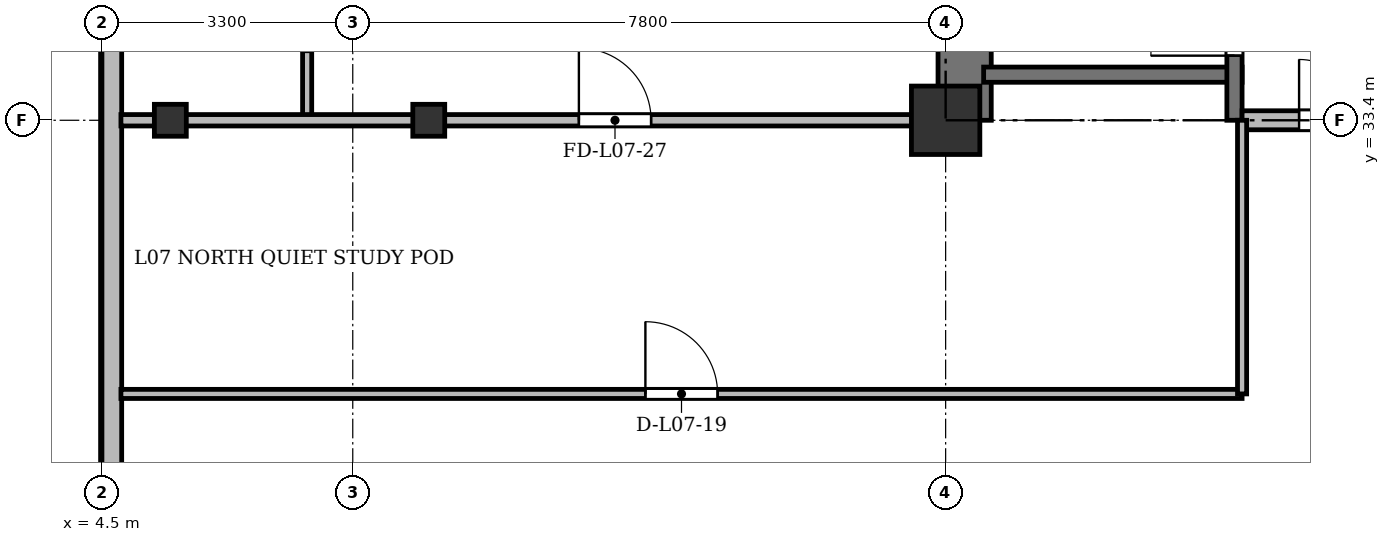
"""IFC4 building model, lengths in metres.
Left out: names, types, materials, properties, quantities, classifications, styles, units other than length and angle.
Written with IfcOpenShell. Run it as: python <this file> out.ifc"""

import sys

from ifc_helpers import new_model, si_unit, direction, frame, frame_2d, origin, origin_2d, place, context, subcontext, project, spatial, rectangle, i_section, extrude, source, transform, mapped, element, fill, save


model = new_model("IFC4")
c1 = context("Model", 3, precision=1e-05, world=origin(), true_north=direction((0.0, 1.0)))
c2 = subcontext(c1, "Body", "Model", "MODEL_VIEW")
j1 = project(units=[si_unit("LENGTHUNIT", "METRE"), si_unit("PLANEANGLEUNIT", "RADIAN")], contexts=[c1])
p1 = place(None, origin())
s1 = spatial("IfcSite", under=j1, at=p1, CompositionType="ELEMENT")
p2 = place(p1, origin())
s2 = spatial("IfcBuilding", under=s1, at=p2, CompositionType="ELEMENT")
p3 = place(p2, frame((0.0, 0.0, 30.7)))
s3 = spatial("IfcBuildingStorey", under=s2, at=p3, CompositionType="ELEMENT", Elevation=30.7)
m1 = source(origin(), c2, "Body", "SweptSolid", [
    extrude(i_section(OverallWidth=0.42, OverallDepth=0.42, WebThickness=0.026, FlangeThickness=0.04, at=origin_2d()), origin(), (0.0, 0.0, 1.0), 3.6),
])
for number, where, z_axis, x_axis in (
    (1, (5.4, 33.4, 0.0), (0.0, 0.0, 1.0), (1.0, 0.0, 0.0)),
    (2, (8.8, 33.4, 0.0), (0.0, 0.0, 1.0), (1.0, 0.0, 0.0)),
):
    element("IfcColumn", number, at=place(p3, frame(where, z_axis=z_axis, x_axis=x_axis)), inside=s3, PredefinedType="COLUMN", context=c2, shape_type="MappedRepresentation", body=[
        mapped(m1, transform((0.0, 0.0, 0.0), x_axis=(1.0, 0.0, 0.0), y_axis=(0.0, 1.0, 0.0), z_axis=(0.0, 0.0, 1.0), scale=1.0)),
    ])
m2 = source(origin(), c2, "Body", "SweptSolid", [
    extrude(rectangle(XDim=0.9, YDim=0.9, at=origin_2d()), origin(), (0.0, 0.0, 1.0), 3.6),
])
p4 = place(p3, frame((15.6, 33.4, 0.0), z_axis=(0.0, 0.0, 1.0), x_axis=(1.0, 0.0, 0.0)))
e3 = element("IfcColumn", 3, at=p4, inside=s3, PredefinedType="COLUMN", context=c2, shape_type="MappedRepresentation", body=[
    mapped(m2, transform((0.0, 0.0, 0.0), x_axis=(1.0, 0.0, 0.0), y_axis=(0.0, 1.0, 0.0), z_axis=(0.0, 0.0, 1.0), scale=1.0)),
])
p5 = place(p3, frame((4.63, 5.9, 0.0), z_axis=(0.0, 0.0, 1.0), x_axis=(0.0, 1.0, 0.0)))
e4 = element("IfcWall", 4, at=p5, inside=s3, PredefinedType="SOLIDWALL", context=c2, shape_type="SweptSolid", body=[
    extrude(rectangle(XDim=39.6, YDim=0.26, at=frame_2d((19.8, 0.0))), origin(), (0.0, 0.0, 1.0), 3.34),
])
p6 = place(p5, frame((1.45, 0.0, 0.92)))
e5 = element("IfcOpeningElement", 5, at=p6, cuts=e4, PredefinedType="OPENING", context=c2, shape_type="SweptSolid", body=[
    extrude(rectangle(XDim=1.2, YDim=1.65, at=frame_2d((0.6, 0.825))), frame((0.0, 0.14, 0.0), z_axis=(0.0, -1.0, 0.0), x_axis=(1.0, 0.0, 0.0)), (0.0, 0.0, 1.0), 0.28),
])
p7 = place(p5, frame((4.3, 0.0, 0.92)))
e6 = element("IfcOpeningElement", 6, at=p7, cuts=e4, PredefinedType="OPENING", context=c2, shape_type="SweptSolid", body=[
    extrude(rectangle(XDim=2.4, YDim=2.1, at=frame_2d((1.2, 1.05))), frame((0.0, 0.14, 0.0), z_axis=(0.0, -1.0, 0.0), x_axis=(1.0, 0.0, 0.0)), (0.0, 0.0, 1.0), 0.28),
])
p8 = place(p5, frame((8.5, 0.0, 0.92)))
e7 = element("IfcOpeningElement", 7, at=p8, cuts=e4, PredefinedType="OPENING", context=c2, shape_type="SweptSolid", body=[
    extrude(rectangle(XDim=2.4, YDim=2.1, at=frame_2d((1.2, 1.05))), frame((0.0, 0.14, 0.0), z_axis=(0.0, -1.0, 0.0), x_axis=(1.0, 0.0, 0.0)), (0.0, 0.0, 1.0), 0.28),
])
p9 = place(p5, frame((33.9, 0.0, 0.92)))
e8 = element("IfcOpeningElement", 8, at=p9, cuts=e4, PredefinedType="OPENING", context=c2, shape_type="SweptSolid", body=[
    extrude(rectangle(XDim=1.2, YDim=1.65, at=frame_2d((0.6, 0.825))), frame((0.0, 0.14, 0.0), z_axis=(0.0, -1.0, 0.0), x_axis=(1.0, 0.0, 0.0)), (0.0, 0.0, 1.0), 0.28),
])
p10 = place(p5, frame((37.25, 0.0, 0.92)))
e9 = element("IfcOpeningElement", 9, at=p10, cuts=e4, PredefinedType="OPENING", context=c2, shape_type="SweptSolid", body=[
    extrude(rectangle(XDim=1.2, YDim=1.65, at=frame_2d((0.6, 0.825))), frame((0.0, 0.14, 0.0), z_axis=(0.0, -1.0, 0.0), x_axis=(1.0, 0.0, 0.0)), (0.0, 0.0, 1.0), 0.28),
])
p11 = place(p3, frame((15.85, 33.4, 0.0), z_axis=(0.0, 0.0, 1.0), x_axis=(0.0, 1.0, 0.0)))
e10 = element("IfcWall", 10, at=p11, inside=s3, PredefinedType="SHEAR", context=c2, shape_type="SweptSolid", body=[
    extrude(rectangle(XDim=11.7, YDim=0.7, at=frame_2d((5.85, 0.0))), origin(), (0.0, 0.0, 1.0), 3.34),
])
p12 = place(p3, frame((16.1, 34.0, 0.0), z_axis=(0.0, 0.0, 1.0), x_axis=(1.0, 0.0, 0.0)))
e11 = element("IfcWall", 11, at=p12, inside=s3, PredefinedType="SHEAR", context=c2, shape_type="SweptSolid", body=[
    extrude(rectangle(XDim=3.4, YDim=0.2, at=frame_2d((1.7, 0.0))), origin(), (0.0, 0.0, 1.0), 3.34),
])
p13 = place(p3, frame((19.4, 33.4, 0.0), z_axis=(0.0, 0.0, 1.0), x_axis=(0.0, 1.0, 0.0)))
e12 = element("IfcWall", 12, at=p13, inside=s3, PredefinedType="SHEAR", context=c2, shape_type="SweptSolid", body=[
    extrude(rectangle(XDim=11.1, YDim=0.2, at=frame_2d((5.55, 0.0))), origin(), (0.0, 0.0, 1.0), 3.34),
])
p14 = place(p13, frame((0.85, 0.0, 0.0)))
e13 = element("IfcOpeningElement", 13, at=p14, cuts=e12, PredefinedType="OPENING", context=c2, shape_type="SweptSolid", body=[
    extrude(rectangle(XDim=1.1, YDim=2.15, at=frame_2d((0.55, 1.075))), frame((0.0, 0.11, 0.0), z_axis=(0.0, -1.0, 0.0), x_axis=(1.0, 0.0, 0.0)), (0.0, 0.0, 1.0), 0.22),
])
p15 = place(p3, frame((19.5, 33.4, 0.0), z_axis=(0.0, 0.0, 1.0), x_axis=(1.0, 0.0, 0.0)))
e14 = element("IfcWall", 14, at=p15, inside=s3, PredefinedType="PARTITIONING", context=c2, shape_type="SweptSolid", body=[
    extrude(rectangle(XDim=6.8, YDim=0.25, at=frame_2d((3.4, 0.0))), origin(), (0.0, 0.0, 1.0), 2.69),
])
p16 = place(p15, frame((0.75, 0.0, 0.0)))
e15 = element("IfcOpeningElement", 15, at=p16, cuts=e14, PredefinedType="OPENING", context=c2, shape_type="SweptSolid", body=[
    extrude(rectangle(XDim=1.6, YDim=2.2, at=frame_2d((0.8, 1.1))), frame((0.0, 0.135, 0.0), z_axis=(0.0, -1.0, 0.0), x_axis=(1.0, 0.0, 0.0)), (0.0, 0.0, 1.0), 0.27),
])
p17 = place(p3, frame((4.75, 29.8, 0.0), z_axis=(0.0, 0.0, 1.0), x_axis=(1.0, 0.0, 0.0)))
e16 = element("IfcWall", 16, at=p17, inside=s3, PredefinedType="PARTITIONING", context=c2, shape_type="SweptSolid", body=[
    extrude(rectangle(XDim=14.75, YDim=0.12, at=frame_2d((7.375, 0.0))), origin(), (0.0, 0.0, 1.0), 2.752),
])
p18 = place(p17, frame((6.9, 0.0, 0.0)))
e17 = element("IfcOpeningElement", 17, at=p18, cuts=e16, PredefinedType="OPENING", context=c2, shape_type="SweptSolid", body=[
    extrude(rectangle(XDim=0.95, YDim=2.15, at=frame_2d((0.475, 1.075))), frame((0.0, 0.07, 0.0), z_axis=(0.0, -1.0, 0.0), x_axis=(1.0, 0.0, 0.0)), (0.0, 0.0, 1.0), 0.14),
])
p19 = place(p3, frame((19.5, 29.8, 0.0), z_axis=(0.0, 0.0, 1.0), x_axis=(0.0, 1.0, 0.0)))
e18 = element("IfcWall", 18, at=p19, inside=s3, PredefinedType="PARTITIONING", context=c2, shape_type="SweptSolid", body=[
    extrude(rectangle(XDim=3.6, YDim=0.12, at=frame_2d((1.8, 0.0))), origin(), (0.0, 0.0, 1.0), 2.69),
])
p20 = place(p3, frame((7.2, 33.4, 0.0), z_axis=(0.0, 0.0, 1.0), x_axis=(0.0, 1.0, 0.0)))
e19 = element("IfcWall", 19, at=p20, inside=s3, PredefinedType="PARTITIONING", context=c2, shape_type="SweptSolid", body=[
    extrude(rectangle(XDim=3.25, YDim=0.12, at=frame_2d((1.625, 0.0))), origin(), (0.0, 0.0, 1.0), 2.69),
])
p21 = place(p20, frame((0.9, 0.0, 0.0)))
e20 = element("IfcOpeningElement", 20, at=p21, cuts=e19, PredefinedType="OPENING", context=c2, shape_type="SweptSolid", body=[
    extrude(rectangle(XDim=0.85, YDim=2.1, at=frame_2d((0.425, 1.05))), frame((0.0, 0.07, 0.0), z_axis=(0.0, -1.0, 0.0), x_axis=(1.0, 0.0, 0.0)), (0.0, 0.0, 1.0), 0.14),
])
p22 = place(p3, frame((4.75, 33.4, 0.0), z_axis=(0.0, 0.0, 1.0), x_axis=(1.0, 0.0, 0.0)))
e21 = element("IfcWall", 21, at=p22, inside=s3, PredefinedType="PARTITIONING", context=c2, shape_type="SweptSolid", body=[
    extrude(rectangle(XDim=10.85, YDim=0.15, at=frame_2d((5.425, 0.0))), origin(), (0.0, 0.0, 1.0), 2.69),
])
p23 = place(p22, frame((6.025, 0.0, 0.0)))
e22 = element("IfcOpeningElement", 22, at=p23, cuts=e21, PredefinedType="OPENING", context=c2, shape_type="SweptSolid", body=[
    extrude(rectangle(XDim=0.95, YDim=2.15, at=frame_2d((0.475, 1.075))), frame((0.0, 0.085, 0.0), z_axis=(0.0, -1.0, 0.0), x_axis=(1.0, 0.0, 0.0)), (0.0, 0.0, 1.0), 0.17),
])
m3 = source(origin(), c2, "Body", "SweptSolid", [
    extrude(rectangle(XDim=1.1, YDim=2.15, at=frame_2d((0.55, 1.075))), frame((0.0, 0.025, 0.0), z_axis=(0.0, -1.0, 0.0), x_axis=(1.0, 0.0, 0.0)), (0.0, 0.0, 1.0), 0.05),
])
p24 = place(p14, origin())
e23 = element("IfcDoor", 23, at=p24, inside=s3, OperationType="SINGLE_SWING_LEFT", PredefinedType="DOOR", context=c2, shape_type="MappedRepresentation", body=[
    mapped(m3, transform((0.0, 0.0, 0.0), x_axis=(1.0, 0.0, 0.0), y_axis=(0.0, 1.0, 0.0), z_axis=(0.0, 0.0, 1.0), scale=1.0)),
])
fill(e13, e23)
m4 = source(origin(), c2, "Body", "SweptSolid", [
    extrude(rectangle(XDim=1.6, YDim=2.2, at=frame_2d((0.8, 1.1))), frame((0.0, 0.025, 0.0), z_axis=(0.0, -1.0, 0.0), x_axis=(1.0, 0.0, 0.0)), (0.0, 0.0, 1.0), 0.05),
])
p25 = place(p16, origin())
e24 = element("IfcDoor", 24, at=p25, inside=s3, OperationType="DOUBLE_DOOR_SINGLE_SWING", PredefinedType="DOOR", context=c2, shape_type="MappedRepresentation", body=[
    mapped(m4, transform((0.0, 0.0, 0.0), x_axis=(1.0, 0.0, 0.0), y_axis=(0.0, 1.0, 0.0), z_axis=(0.0, 0.0, 1.0), scale=1.0)),
])
fill(e15, e24)
m5 = source(origin(), c2, "Body", "SweptSolid", [
    extrude(rectangle(XDim=0.95, YDim=2.15, at=frame_2d((0.475, 1.075))), frame((0.0, 0.025, 0.0), z_axis=(0.0, -1.0, 0.0), x_axis=(1.0, 0.0, 0.0)), (0.0, 0.0, 1.0), 0.05),
])
p26 = place(p18, origin())
e25 = element("IfcDoor", 25, at=p26, inside=s3, OperationType="SINGLE_SWING_LEFT", PredefinedType="DOOR", context=c2, shape_type="MappedRepresentation", body=[
    mapped(m5, transform((0.0, 0.0, 0.0), x_axis=(1.0, 0.0, 0.0), y_axis=(0.0, 1.0, 0.0), z_axis=(0.0, 0.0, 1.0), scale=1.0)),
])
fill(e17, e25)
m6 = source(origin(), c2, "Body", "SweptSolid", [
    extrude(rectangle(XDim=0.85, YDim=2.1, at=frame_2d((0.425, 1.05))), frame((0.0, 0.025, 0.0), z_axis=(0.0, -1.0, 0.0), x_axis=(1.0, 0.0, 0.0)), (0.0, 0.0, 1.0), 0.05),
])
p27 = place(p21, origin())
e26 = element("IfcDoor", 26, at=p27, inside=s3, OperationType="SINGLE_SWING_RIGHT", PredefinedType="DOOR", context=c2, shape_type="MappedRepresentation", body=[
    mapped(m6, transform((0.0, 0.0, 0.0), x_axis=(1.0, 0.0, 0.0), y_axis=(0.0, 1.0, 0.0), z_axis=(0.0, 0.0, 1.0), scale=1.0)),
])
fill(e20, e26)
p28 = place(p23, origin())
e27 = element("IfcDoor", 27, at=p28, inside=s3, OperationType="SINGLE_SWING_LEFT", PredefinedType="DOOR", context=c2, shape_type="MappedRepresentation", body=[
    mapped(m5, transform((0.0, 0.0, 0.0), x_axis=(1.0, 0.0, 0.0), y_axis=(0.0, 1.0, 0.0), z_axis=(0.0, 0.0, 1.0), scale=1.0)),
])
fill(e22, e27)
save(model, sys.argv[1])
